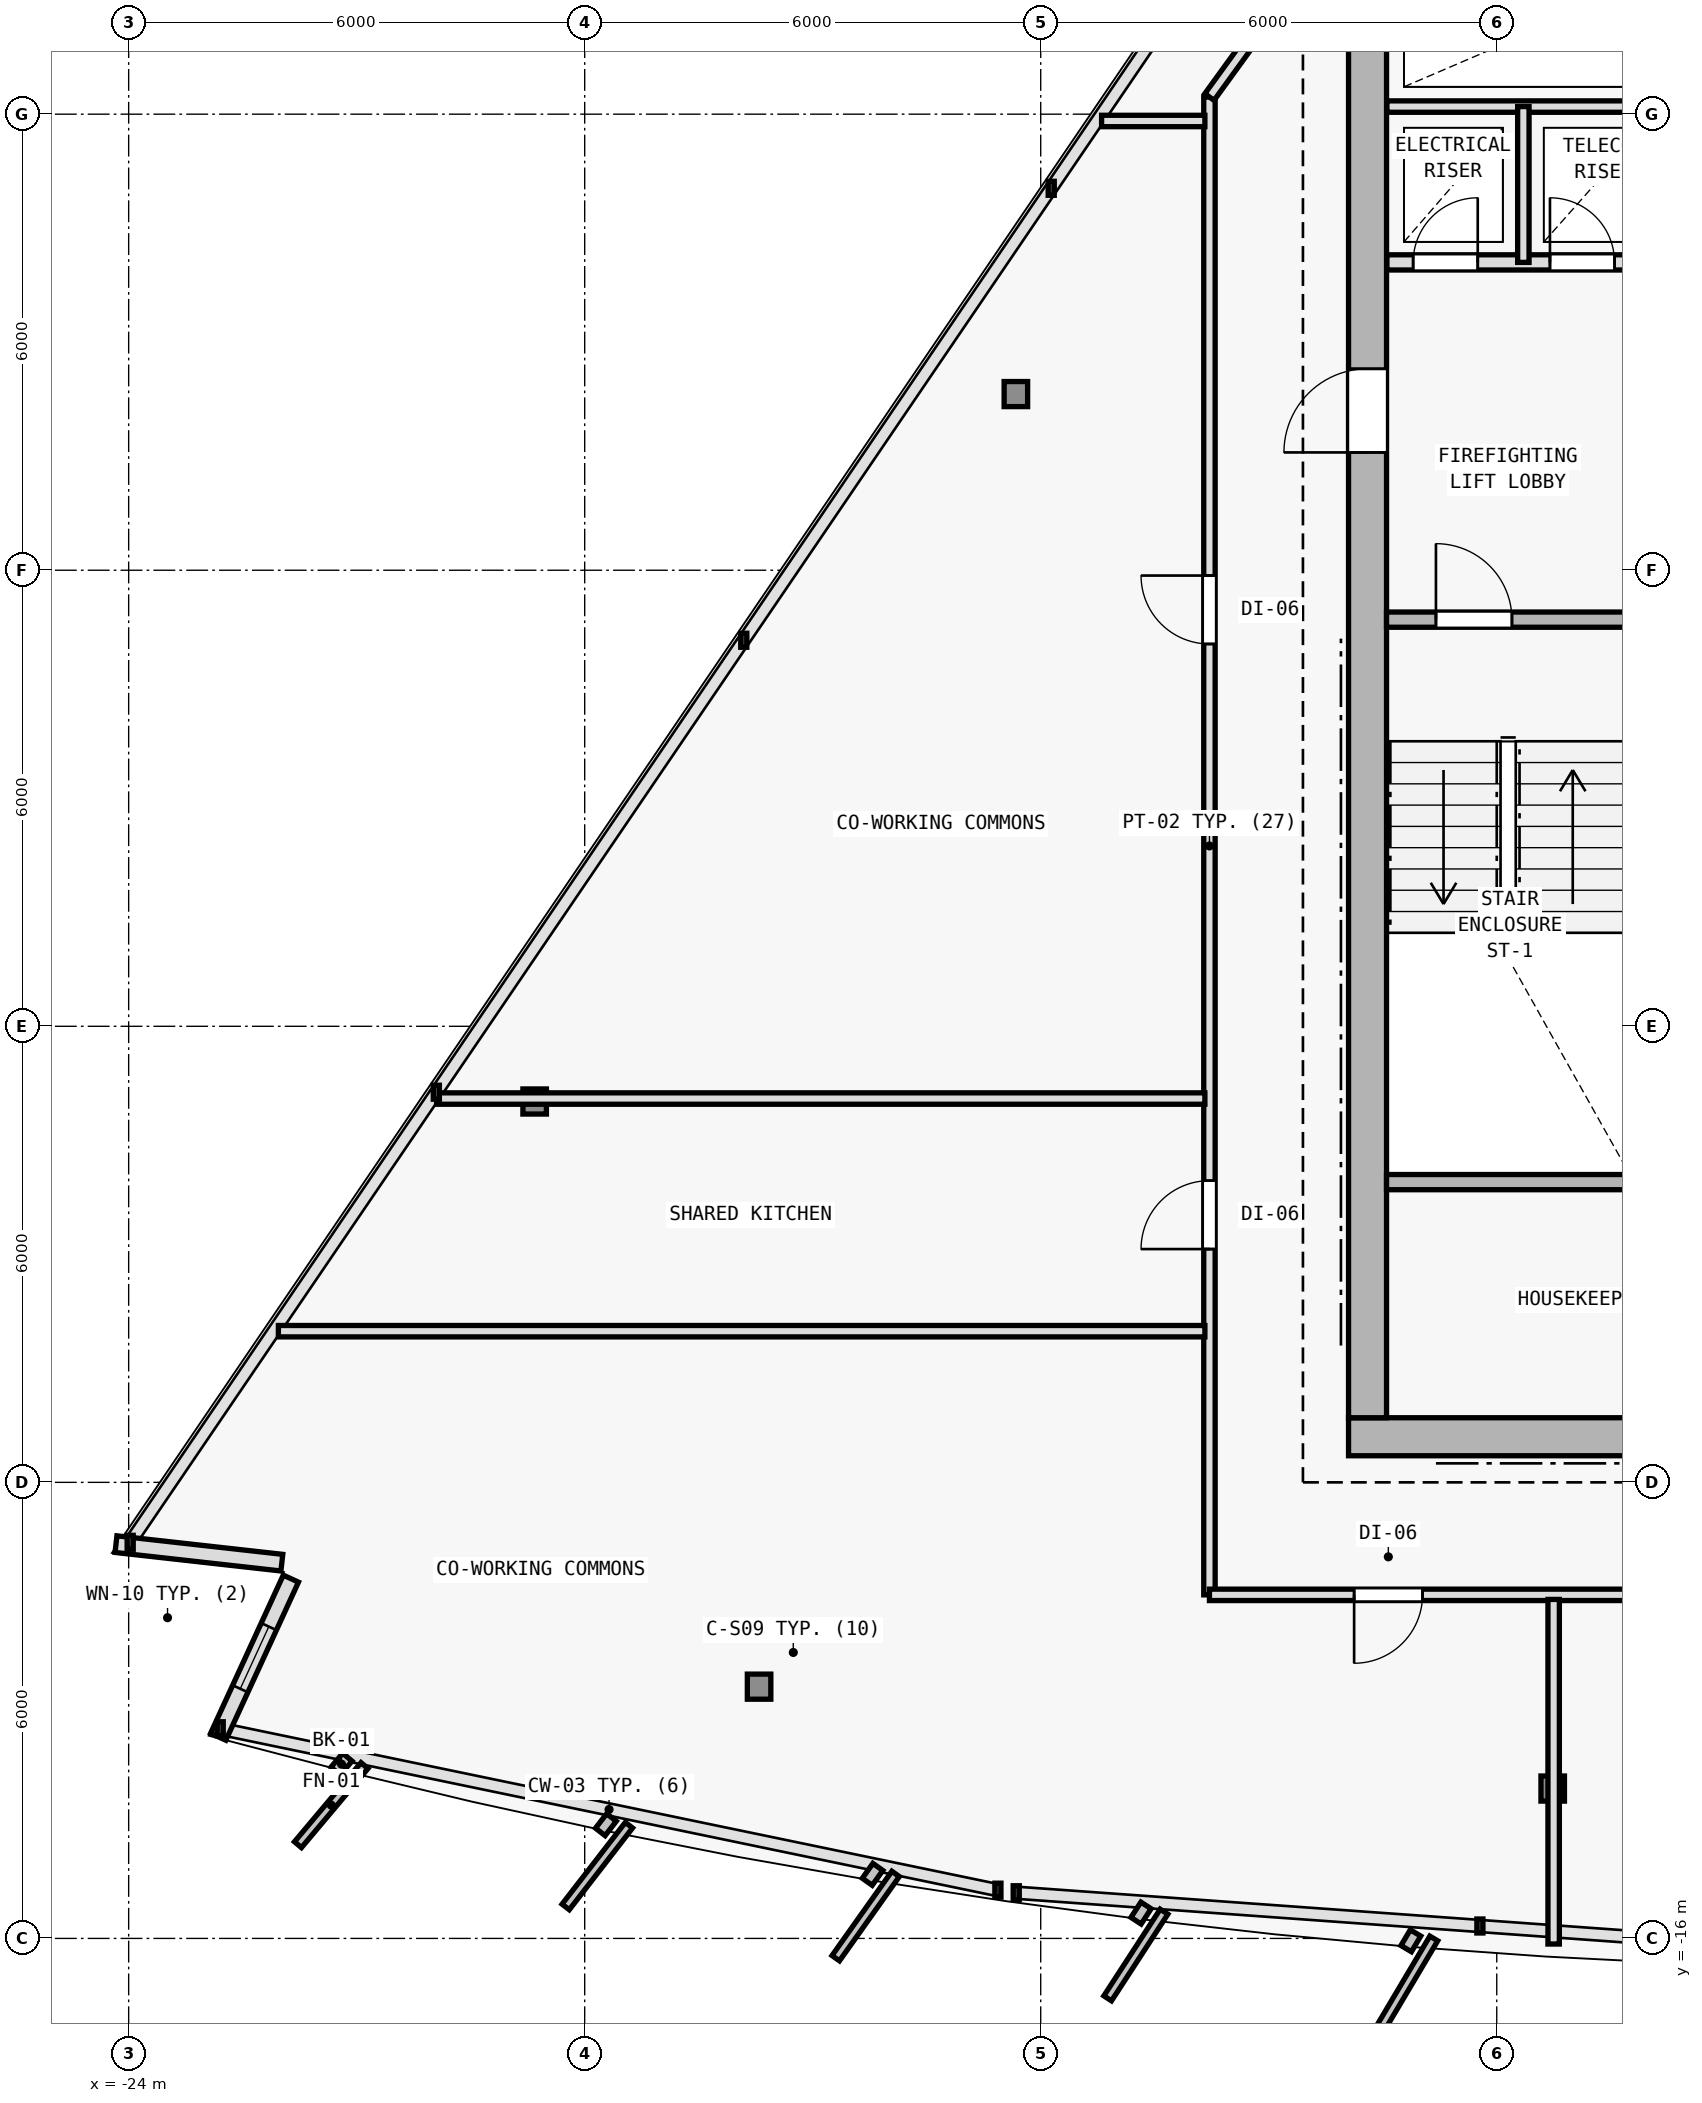
"""IFC4 building model, lengths in metres.
Left out: names, types, materials, properties, quantities, classifications, styles, units other than length and angle.
Written with IfcOpenShell. Run it as: python <this file> out.ifc"""

import sys

from ifc_helpers import new_model, si_unit, direction, frame, frame_2d, origin, origin_2d, place, context, subcontext, project, spatial, rectangle, i_section, extrude, element, fill, save


model = new_model("IFC4")
c1 = context("Model", 3, precision=1e-05, world=origin(), true_north=direction((0.0, 1.0)))
c2 = subcontext(c1, "Body", "Model", "MODEL_VIEW")
j1 = project(units=[si_unit("LENGTHUNIT", "METRE"), si_unit("PLANEANGLEUNIT", "RADIAN")], contexts=[c1])
p1 = place(None, origin())
s1 = spatial("IfcSite", under=j1, at=p1, CompositionType="ELEMENT")
p2 = place(p1, origin())
s2 = spatial("IfcBuilding", under=s1, at=p2, CompositionType="ELEMENT")
p3 = place(p2, frame((0.0, 0.0, 261.6)))
s3 = spatial("IfcBuildingStorey", under=s2, at=p3, CompositionType="ELEMENT", Elevation=261.6)
for number, where, z_axis, x_axis in (
    (1, (-7.7, -9.4, 0.0), (0.0, 0.0, 1.0), (1.0, 0.0, 0.0)),
    (2, (-7.7, 2.0, 0.0), (0.0, 0.0, 1.0), (1.0, 0.0, 0.0)),
):
    element("IfcColumn", number, at=place(p3, frame(where, z_axis=z_axis, x_axis=x_axis)), inside=s3, PredefinedType="COLUMN", context=c2, shape_type="SweptSolid", body=[
        extrude(i_section(OverallWidth=0.374, OverallDepth=0.372, WebThickness=0.012, FlangeThickness=0.02, FilletRadius=0.015, at=origin_2d()), origin(), (0.0, 0.0, 1.0), 3.6),
    ])
p4 = place(p3, frame((-15.706, -12.688, 0.005), z_axis=(0.020594893987, 0.033509183946, 0.999226193078), x_axis=(-0.851954850327, 0.523615252838, 0.0)))
e3 = element("IfcColumn", 3, at=p4, inside=s3, PredefinedType="COLUMN", context=c2, shape_type="SweptSolid", body=[
    extrude(i_section(OverallWidth=0.309, OverallDepth=0.33, WebThickness=0.011, FlangeThickness=0.019, FilletRadius=0.027, at=origin_2d()), origin(), (0.0, 0.0, 1.0), 3.592),
])
p5 = place(p3, frame((-5.264, -14.028, 0.005), z_axis=(0.006865858153, 0.03521301508, 0.99935624457), x_axis=(-0.981516643497, 0.191376797284, 0.0)))
e4 = element("IfcColumn", 4, at=p5, inside=s3, PredefinedType="COLUMN", context=c2, shape_type="SweptSolid", body=[
    extrude(i_section(OverallWidth=0.309, OverallDepth=0.33, WebThickness=0.011, FlangeThickness=0.019, FilletRadius=0.027, at=origin_2d()), origin(), (0.0, 0.0, 1.0), 3.591),
])
p6 = place(p3, frame((-12.327, 4.318, 0.005), z_axis=(0.01700241672, 0.009521353363, 0.999810112799), x_axis=(-0.488603368932, 0.87250601595, 0.0)))
e5 = element("IfcColumn", 5, at=p6, inside=s3, PredefinedType="COLUMN", context=c2, shape_type="SweptSolid", body=[
    extrude(i_section(OverallWidth=0.309, OverallDepth=0.33, WebThickness=0.011, FlangeThickness=0.019, FilletRadius=0.027, at=origin_2d()), origin(), (0.0, 0.0, 1.0), 3.59),
])
p7 = place(p3, frame((-18.658, -4.99, 0.005), z_axis=(0.025222449659, 0.021619242565, 0.999448065876), x_axis=(-0.650791373456, 0.759256602365, 0.0)))
e6 = element("IfcColumn", 6, at=p7, inside=s3, PredefinedType="COLUMN", context=c2, shape_type="SweptSolid", body=[
    extrude(i_section(OverallWidth=0.309, OverallDepth=0.33, WebThickness=0.011, FlangeThickness=0.019, FilletRadius=0.027, at=origin_2d()), origin(), (0.0, 0.0, 1.0), 3.591),
])
p8 = place(p3, frame((-21.985, -11.057, 0.0), z_axis=(0.0, 0.0, 1.0), x_axis=(-0.993823926228, 0.110968480463, 0.0)))
e7 = element("IfcWall", 7, at=p8, inside=s3, PredefinedType="SOLIDWALL", context=c2, shape_type="SweptSolid", body=[
    extrude(rectangle(XDim=2.196, YDim=0.22, at=frame_2d((1.098, 0.0))), origin(), (0.0, 0.0, 1.0), 3.35),
])
p9 = place(p3, frame((-22.822, -13.347, 0.0), z_axis=(0.0, 0.0, 1.0), x_axis=(0.417447808253, 0.908700900949, 0.0)))
e8 = element("IfcWall", 8, at=p9, inside=s3, PredefinedType="SOLIDWALL", context=c2, shape_type="SweptSolid", body=[
    extrude(rectangle(XDim=2.289, YDim=0.22, at=frame_2d((1.145, 0.0))), origin(), (0.0, 0.0, 1.0), 3.35),
])
p10 = place(p9, frame((0.695, 0.0, 0.62)))
e9 = element("IfcOpeningElement", 9, at=p10, cuts=e8, PredefinedType="OPENING", context=c2, shape_type="SweptSolid", body=[
    extrude(rectangle(XDim=0.9, YDim=1.6, at=frame_2d((0.45, 0.8))), frame((0.0, 0.12, 0.0), z_axis=(0.0, -1.0, 0.0), x_axis=(1.0, 0.0, 0.0)), (0.0, 0.0, 1.0), 0.24),
])
p11 = place(p3, frame((-7.95, -9.4, 0.0), z_axis=(0.0, 0.0, 1.0), x_axis=(1.0, 0.0, 0.0)))
e10 = element("IfcWall", 10, at=p11, inside=s3, PredefinedType="SHEAR", context=c2, shape_type="SweptSolid", body=[
    extrude(rectangle(XDim=15.9, YDim=0.5, at=frame_2d((7.95, 0.0))), origin(), (0.0, 0.0, 1.0), 3.35),
])
p12 = place(p11, frame((9.6, 0.0, 0.0)))
e11 = element("IfcOpeningElement", 11, at=p12, cuts=e10, PredefinedType="OPENING", context=c2, shape_type="SweptSolid", body=[
    extrude(rectangle(XDim=1.5, YDim=2.2, at=frame_2d((0.75, 1.1))), frame((0.0, 0.26, 0.0), z_axis=(0.0, -1.0, 0.0), x_axis=(1.0, 0.0, 0.0)), (0.0, 0.0, 1.0), 0.52),
])
p13 = place(p3, frame((-7.7, -9.15, 0.0), z_axis=(0.0, 0.0, 1.0), x_axis=(0.0, 1.0, 0.0)))
e12 = element("IfcWall", 12, at=p13, inside=s3, PredefinedType="SHEAR", context=c2, shape_type="SweptSolid", body=[
    extrude(rectangle(XDim=19.1, YDim=0.5, at=frame_2d((9.55, 0.0))), origin(), (0.0, 0.0, 1.0), 3.35),
])
p14 = place(p13, frame((12.7, 0.0, 0.0)))
e13 = element("IfcOpeningElement", 13, at=p14, cuts=e12, PredefinedType="OPENING", context=c2, shape_type="SweptSolid", body=[
    extrude(rectangle(XDim=1.1, YDim=2.15, at=frame_2d((0.55, 1.075))), frame((0.0, 0.26, 0.0), z_axis=(0.0, -1.0, 0.0), x_axis=(1.0, 0.0, 0.0)), (0.0, 0.0, 1.0), 0.52),
])
p15 = place(p3, frame((-7.45, 1.35, 0.0), z_axis=(0.0, 0.0, 1.0), x_axis=(1.0, 0.0, 0.0)))
e14 = element("IfcWall", 14, at=p15, inside=s3, PredefinedType="SOLIDWALL", context=c2, shape_type="SweptSolid", body=[
    extrude(rectangle(XDim=3.4, YDim=0.2, at=frame_2d((1.7, 0.0))), origin(), (0.0, 0.0, 1.0), 3.35),
])
p16 = place(p15, frame((0.65, 0.0, 0.0)))
e15 = element("IfcOpeningElement", 15, at=p16, cuts=e14, PredefinedType="OPENING", context=c2, shape_type="SweptSolid", body=[
    extrude(rectangle(XDim=1.0, YDim=2.15, at=frame_2d((0.5, 1.075))), frame((0.0, 0.11, 0.0), z_axis=(0.0, -1.0, 0.0), x_axis=(1.0, 0.0, 0.0)), (0.0, 0.0, 1.0), 0.22),
])
p17 = place(p3, frame((-7.445, 6.05, 0.0), z_axis=(0.0, 0.0, 1.0), x_axis=(1.0, 0.0, 0.0)))
e16 = element("IfcWall", 16, at=p17, inside=s3, PredefinedType="SOLIDWALL", context=c2, shape_type="SweptSolid", body=[
    extrude(rectangle(XDim=3.595, YDim=0.2, at=frame_2d((1.797, 0.0))), origin(), (0.0, 0.0, 1.0), 3.35),
])
p18 = place(p17, frame((0.345, 0.0, 0.0)))
e17 = element("IfcOpeningElement", 17, at=p18, cuts=e16, PredefinedType="OPENING", context=c2, shape_type="SweptSolid", body=[
    extrude(rectangle(XDim=0.85, YDim=2.1, at=frame_2d((0.425, 1.05))), frame((0.0, 0.11, 0.0), z_axis=(0.0, -1.0, 0.0), x_axis=(1.0, 0.0, 0.0)), (0.0, 0.0, 1.0), 0.22),
])
p19 = place(p17, frame((2.145, 0.0, 0.0)))
e18 = element("IfcOpeningElement", 18, at=p19, cuts=e16, PredefinedType="OPENING", context=c2, shape_type="SweptSolid", body=[
    extrude(rectangle(XDim=0.85, YDim=2.1, at=frame_2d((0.425, 1.05))), frame((0.0, 0.11, 0.0), z_axis=(0.0, -1.0, 0.0), x_axis=(1.0, 0.0, 0.0)), (0.0, 0.0, 1.0), 0.22),
])
p20 = place(p3, frame((-7.445, 8.1, 0.0), z_axis=(0.0, 0.0, 1.0), x_axis=(1.0, 0.0, 0.0)))
e19 = element("IfcWall", 19, at=p20, inside=s3, PredefinedType="PARTITIONING", context=c2, shape_type="SweptSolid", body=[
    extrude(rectangle(XDim=3.595, YDim=0.15, at=frame_2d((1.797, 0.0))), origin(), (0.0, 0.0, 1.0), 3.35),
])
p21 = place(p3, frame((-5.65, 6.05, 0.0), z_axis=(0.0, 0.0, 1.0), x_axis=(0.0, 1.0, 0.0)))
e20 = element("IfcWall", 20, at=p21, inside=s3, PredefinedType="PARTITIONING", context=c2, shape_type="SweptSolid", body=[
    extrude(rectangle(XDim=2.05, YDim=0.15, at=frame_2d((1.025, 0.0))), origin(), (0.0, 0.0, 1.0), 3.35),
])
p22 = place(p3, frame((-7.45, -6.05, 0.0), z_axis=(0.0, 0.0, 1.0), x_axis=(1.0, 0.0, 0.0)))
e21 = element("IfcWall", 21, at=p22, inside=s3, PredefinedType="SOLIDWALL", context=c2, shape_type="SweptSolid", body=[
    extrude(rectangle(XDim=3.4, YDim=0.2, at=frame_2d((1.7, 0.0))), origin(), (0.0, 0.0, 1.0), 3.35),
])
p23 = place(p3, frame((-9.78, -11.48, 0.0), z_axis=(0.0, 0.0, 1.0), x_axis=(0.0, 1.0, 0.0)))
e22 = element("IfcWall", 22, at=p23, inside=s3, PredefinedType="PARTITIONING", context=c2, shape_type="SweptSolid", body=[
    extrude(rectangle(XDim=19.706, YDim=0.15, at=frame_2d((9.853, 0.0))), origin(), (0.0, 0.0, 1.0), 2.875),
])
p24 = place(p23, frame((12.51, 0.0, 0.0)))
e23 = element("IfcOpeningElement", 23, at=p24, cuts=e22, PredefinedType="OPENING", context=c2, shape_type="SweptSolid", body=[
    extrude(rectangle(XDim=0.9, YDim=2.1, at=frame_2d((0.45, 1.05))), frame((0.0, 0.085, 0.0), z_axis=(0.0, -1.0, 0.0), x_axis=(1.0, 0.0, 0.0)), (0.0, 0.0, 1.0), 0.17),
])
p25 = place(p23, frame((4.549, 0.0, 0.0)))
e24 = element("IfcOpeningElement", 24, at=p25, cuts=e22, PredefinedType="OPENING", context=c2, shape_type="SweptSolid", body=[
    extrude(rectangle(XDim=0.9, YDim=2.1, at=frame_2d((0.45, 1.05))), frame((0.0, 0.085, 0.0), z_axis=(0.0, -1.0, 0.0), x_axis=(1.0, 0.0, 0.0)), (0.0, 0.0, 1.0), 0.17),
])
p26 = place(p3, frame((-9.78, 8.226, 0.0), z_axis=(0.0, 0.0, 1.0), x_axis=(0.586956386413, 0.809618552436, 0.0)))
e25 = element("IfcWall", 25, at=p26, inside=s3, PredefinedType="PARTITIONING", context=c2, shape_type="SweptSolid", body=[
    extrude(rectangle(XDim=5.008, YDim=0.15, at=frame_2d((2.504, 0.0))), origin(), (0.0, 0.0, 1.0), 2.995),
])
p27 = place(p3, frame((9.78, -11.48, 0.0), z_axis=(0.0, 0.0, 1.0), x_axis=(-1.0, 0.0, 0.0)))
e26 = element("IfcWall", 26, at=p27, inside=s3, PredefinedType="PARTITIONING", context=c2, shape_type="SweptSolid", body=[
    extrude(rectangle(XDim=19.56, YDim=0.15, at=frame_2d((9.78, 0.0))), origin(), (0.0, 0.0, 1.0), 2.725),
])
p28 = place(p27, frame((16.757, 0.0, 0.0)))
e27 = element("IfcOpeningElement", 27, at=p28, cuts=e26, PredefinedType="OPENING", context=c2, shape_type="SweptSolid", body=[
    extrude(rectangle(XDim=0.9, YDim=2.1, at=frame_2d((0.45, 1.05))), frame((0.0, 0.085, 0.0), z_axis=(0.0, -1.0, 0.0), x_axis=(1.0, 0.0, 0.0)), (0.0, 0.0, 1.0), 0.17),
])
p29 = place(p27, frame((12.983, 0.0, 0.0)))
e28 = element("IfcOpeningElement", 28, at=p29, cuts=e26, PredefinedType="OPENING", context=c2, shape_type="SweptSolid", body=[
    extrude(rectangle(XDim=0.9, YDim=2.1, at=frame_2d((0.45, 1.05))), frame((0.0, 0.085, 0.0), z_axis=(0.0, -1.0, 0.0), x_axis=(1.0, 0.0, 0.0)), (0.0, 0.0, 1.0), 0.17),
])
p30 = place(p27, frame((9.786, 0.0, 0.0)))
e29 = element("IfcOpeningElement", 29, at=p30, cuts=e26, PredefinedType="OPENING", context=c2, shape_type="SweptSolid", body=[
    extrude(rectangle(XDim=0.9, YDim=2.1, at=frame_2d((0.45, 1.05))), frame((0.0, 0.085, 0.0), z_axis=(0.0, -1.0, 0.0), x_axis=(1.0, 0.0, 0.0)), (0.0, 0.0, 1.0), 0.17),
])
p31 = place(p27, frame((6.133, 0.0, 0.0)))
e30 = element("IfcOpeningElement", 30, at=p31, cuts=e26, PredefinedType="OPENING", context=c2, shape_type="SweptSolid", body=[
    extrude(rectangle(XDim=0.9, YDim=2.1, at=frame_2d((0.45, 1.05))), frame((0.0, 0.085, 0.0), z_axis=(0.0, -1.0, 0.0), x_axis=(1.0, 0.0, 0.0)), (0.0, 0.0, 1.0), 0.17),
])
p32 = place(p27, frame((1.904, 0.0, 0.0)))
e31 = element("IfcOpeningElement", 31, at=p32, cuts=e26, PredefinedType="OPENING", context=c2, shape_type="SweptSolid", body=[
    extrude(rectangle(XDim=0.9, YDim=2.1, at=frame_2d((0.45, 1.05))), frame((0.0, 0.085, 0.0), z_axis=(0.0, -1.0, 0.0), x_axis=(1.0, 0.0, 0.0)), (0.0, 0.0, 1.0), 0.17),
])
p33 = place(p3, frame((-5.251, -11.54, 0.0), z_axis=(0.0, 0.0, 1.0), x_axis=(0.0, -1.0, 0.0)))
e32 = element("IfcWall", 32, at=p33, inside=s3, PredefinedType="PARTITIONING", context=c2, shape_type="SweptSolid", body=[
    extrude(rectangle(XDim=4.534, YDim=0.15, at=frame_2d((2.267, 0.0))), origin(), (0.0, 0.0, 1.0), 3.015),
])
p34 = place(p3, frame((-9.84, -4.951, 0.0), z_axis=(0.0, 0.0, 1.0), x_axis=(-1.0, 0.0, 0.0)))
e33 = element("IfcWall", 33, at=p34, inside=s3, PredefinedType="PARTITIONING", context=c2, shape_type="SweptSolid", body=[
    extrude(rectangle(XDim=10.108, YDim=0.15, at=frame_2d((5.054, 0.0))), origin(), (0.0, 0.0, 1.0), 2.875),
])
p35 = place(p3, frame((-9.84, -8.011, 0.0), z_axis=(0.0, 0.0, 1.0), x_axis=(-1.0, 0.0, 0.0)))
e34 = element("IfcWall", 34, at=p35, inside=s3, PredefinedType="PARTITIONING", context=c2, shape_type="SweptSolid", body=[
    extrude(rectangle(XDim=12.19, YDim=0.15, at=frame_2d((6.095, 0.0))), origin(), (0.0, 0.0, 1.0), 2.875),
])
p36 = place(p3, frame((-9.84, 7.91, 0.0), z_axis=(0.0, 0.0, 1.0), x_axis=(-1.0, 0.0, 0.0)))
e35 = element("IfcWall", 35, at=p36, inside=s3, PredefinedType="PARTITIONING", context=c2, shape_type="SweptSolid", body=[
    extrude(rectangle(XDim=1.359, YDim=0.15, at=frame_2d((0.68, 0.0))), origin(), (0.0, 0.0, 1.0), 3.015),
])
p37 = place(p10, origin())
e36 = element("IfcWindow", 36, at=p37, inside=s3, PartitioningType="SINGLE_PANEL", PredefinedType="WINDOW", context=c2, shape_type="SweptSolid", body=[
    extrude(rectangle(XDim=0.9, YDim=1.6, at=frame_2d((0.45, 0.8))), frame((0.0, 0.03, 0.0), z_axis=(0.0, -1.0, 0.0), x_axis=(1.0, 0.0, 0.0)), (0.0, 0.0, 1.0), 0.06),
])
fill(e9, e36)
p38 = place(p14, origin())
e37 = element("IfcDoor", 37, at=p38, inside=s3, OperationType="SINGLE_SWING_LEFT", PredefinedType="DOOR", context=c2, shape_type="SweptSolid", body=[
    extrude(rectangle(XDim=1.1, YDim=2.15, at=frame_2d((0.55, 1.075))), frame((0.0, 0.025, 0.0), z_axis=(0.0, -1.0, 0.0), x_axis=(1.0, 0.0, 0.0)), (0.0, 0.0, 1.0), 0.05),
])
fill(e13, e37)
p39 = place(p16, origin())
e38 = element("IfcDoor", 38, at=p39, inside=s3, OperationType="SINGLE_SWING_LEFT", PredefinedType="DOOR", context=c2, shape_type="SweptSolid", body=[
    extrude(rectangle(XDim=1.0, YDim=2.15, at=frame_2d((0.5, 1.075))), frame((0.0, 0.025, 0.0), z_axis=(0.0, -1.0, 0.0), x_axis=(1.0, 0.0, 0.0)), (0.0, 0.0, 1.0), 0.05),
])
fill(e15, e38)
p40 = place(p18, origin())
e39 = element("IfcDoor", 39, at=p40, inside=s3, OperationType="SINGLE_SWING_RIGHT", PredefinedType="DOOR", context=c2, shape_type="SweptSolid", body=[
    extrude(rectangle(XDim=0.85, YDim=2.1, at=frame_2d((0.425, 1.05))), frame((0.0, 0.025, 0.0), z_axis=(0.0, -1.0, 0.0), x_axis=(1.0, 0.0, 0.0)), (0.0, 0.0, 1.0), 0.05),
])
fill(e17, e39)
p41 = place(p19, origin())
e40 = element("IfcDoor", 40, at=p41, inside=s3, OperationType="SINGLE_SWING_LEFT", PredefinedType="DOOR", context=c2, shape_type="SweptSolid", body=[
    extrude(rectangle(XDim=0.85, YDim=2.1, at=frame_2d((0.425, 1.05))), frame((0.0, 0.025, 0.0), z_axis=(0.0, -1.0, 0.0), x_axis=(1.0, 0.0, 0.0)), (0.0, 0.0, 1.0), 0.05),
])
fill(e18, e40)
p42 = place(p24, origin())
e41 = element("IfcDoor", 41, at=p42, inside=s3, OperationType="SINGLE_SWING_RIGHT", PredefinedType="DOOR", context=c2, shape_type="SweptSolid", body=[
    extrude(rectangle(XDim=0.9, YDim=2.1, at=frame_2d((0.45, 1.05))), frame((0.0, 0.025, 0.0), z_axis=(0.0, -1.0, 0.0), x_axis=(1.0, 0.0, 0.0)), (0.0, 0.0, 1.0), 0.05),
])
fill(e23, e41)
p43 = place(p25, origin())
e42 = element("IfcDoor", 42, at=p43, inside=s3, OperationType="SINGLE_SWING_LEFT", PredefinedType="DOOR", context=c2, shape_type="SweptSolid", body=[
    extrude(rectangle(XDim=0.9, YDim=2.1, at=frame_2d((0.45, 1.05))), frame((0.0, 0.025, 0.0), z_axis=(0.0, -1.0, 0.0), x_axis=(1.0, 0.0, 0.0)), (0.0, 0.0, 1.0), 0.05),
])
fill(e24, e42)
p44 = place(p28, origin())
e43 = element("IfcDoor", 43, at=p44, inside=s3, OperationType="SINGLE_SWING_RIGHT", PredefinedType="DOOR", context=c2, shape_type="SweptSolid", body=[
    extrude(rectangle(XDim=0.9, YDim=2.1, at=frame_2d((0.45, 1.05))), frame((0.0, 0.025, 0.0), z_axis=(0.0, -1.0, 0.0), x_axis=(1.0, 0.0, 0.0)), (0.0, 0.0, 1.0), 0.05),
])
fill(e27, e43)
save(model, sys.argv[1])
